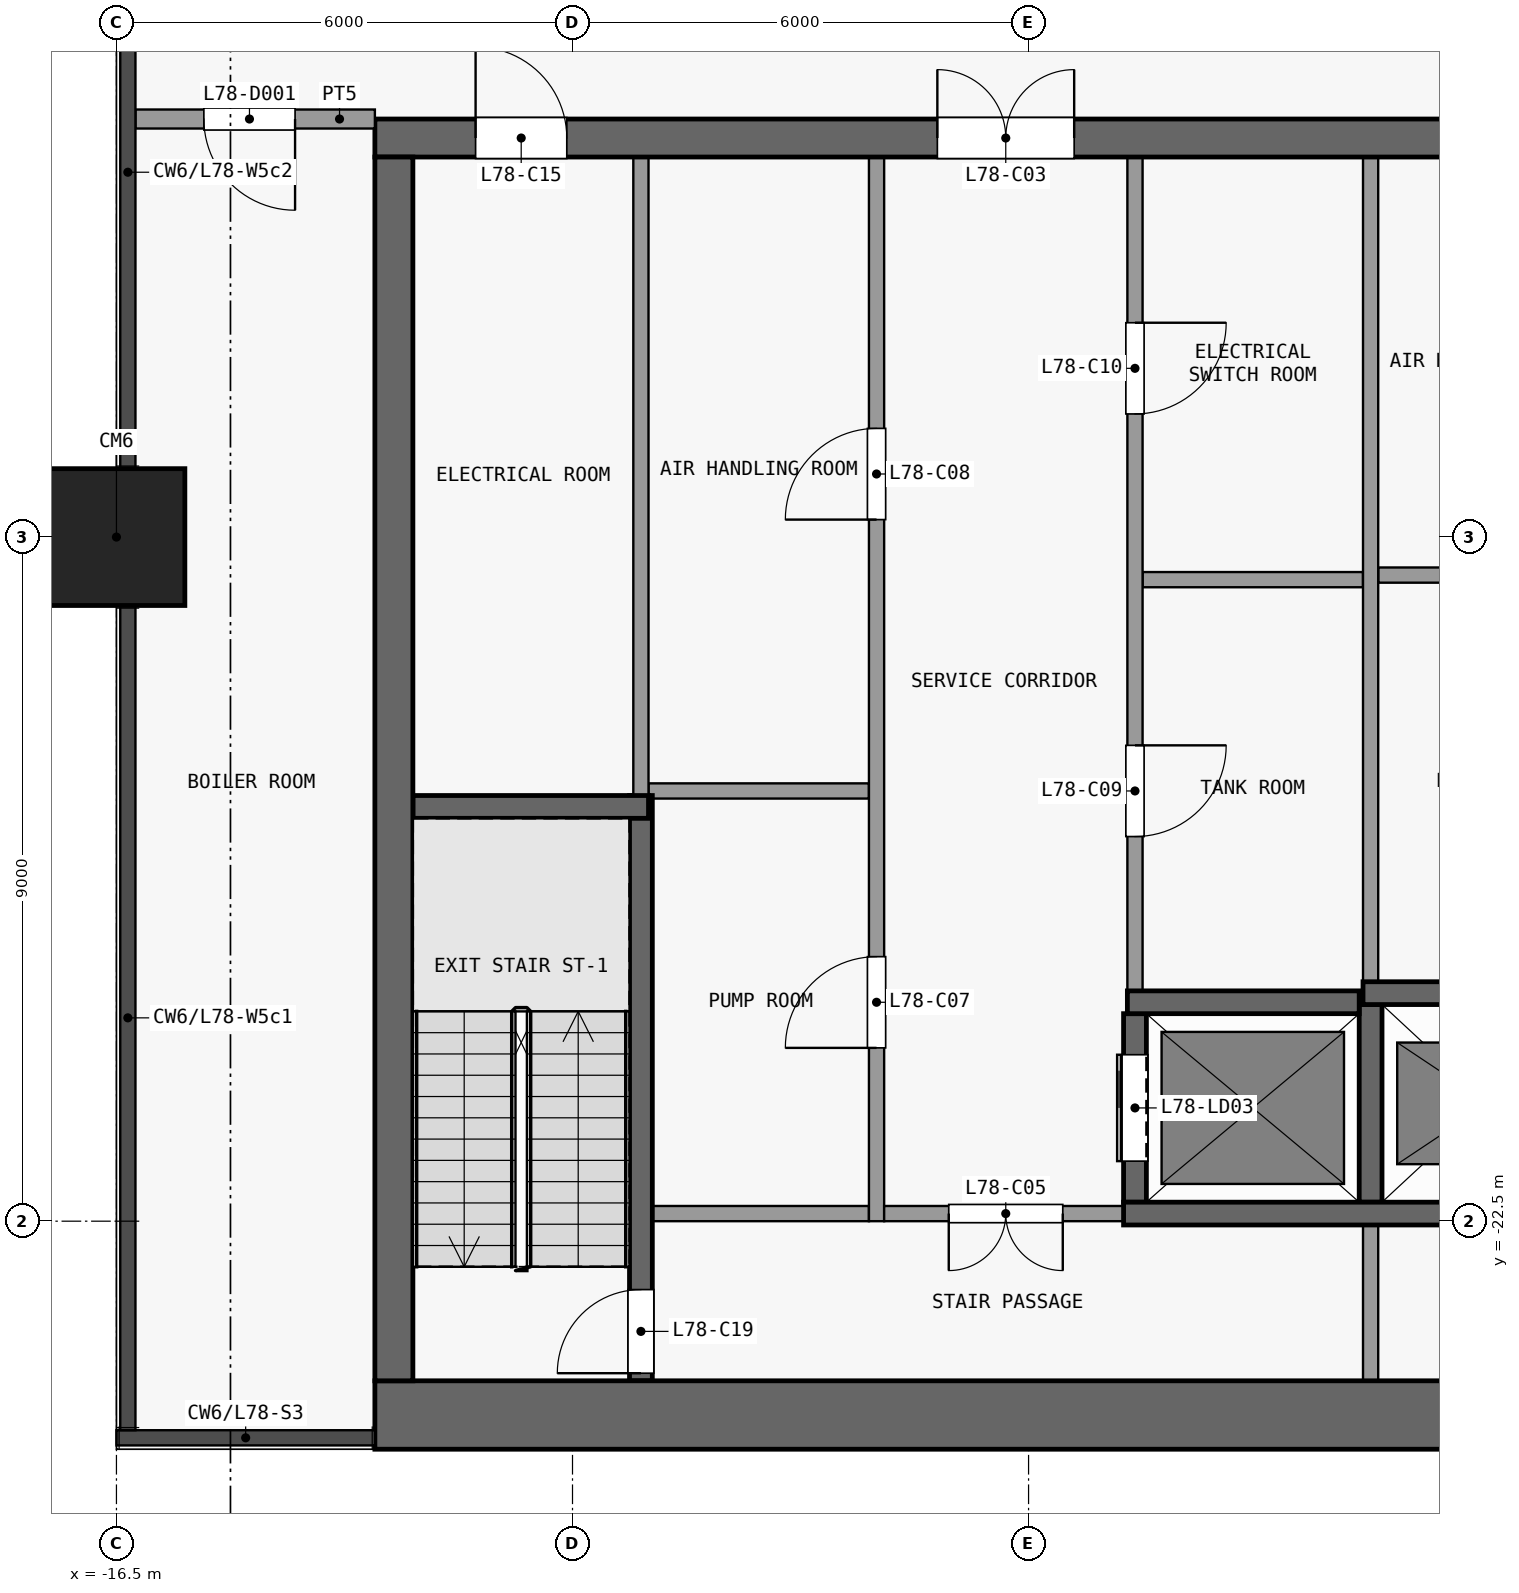
"""IFC4 building model, lengths in metres.
Left out: names, types, materials, properties, quantities, classifications, styles, units other than length and angle.
Written with IfcOpenShell. Run it as: python <this file> out.ifc"""

import sys

from ifc_helpers import new_model, si_unit, direction, frame, frame_2d, origin, origin_2d, place, context, subcontext, project, spatial, rectangle, extrude, element, fill, save


model = new_model("IFC4")
c1 = context("Model", 3, precision=1e-05, world=origin(), true_north=direction((0.0, 1.0)))
c2 = subcontext(c1, "Body", "Model", "MODEL_VIEW")
j1 = project(units=[si_unit("LENGTHUNIT", "METRE"), si_unit("PLANEANGLEUNIT", "RADIAN")], contexts=[c1])
p1 = place(None, origin())
s1 = spatial("IfcSite", under=j1, at=p1, CompositionType="ELEMENT")
p2 = place(p1, origin())
s2 = spatial("IfcBuilding", under=s1, at=p2, CompositionType="ELEMENT")
p3 = place(p2, frame((0.0, 0.0, 307.7)))
s3 = spatial("IfcBuildingStorey", under=s2, at=p3, CompositionType="ELEMENT", Elevation=307.7)
p4 = place(p3, frame((-16.5, -13.5, 0.0), z_axis=(0.0, 0.0, 1.0), x_axis=(1.0, 0.0, 0.0)))
e1 = element("IfcColumn", 1, at=p4, inside=s3, PredefinedType="COLUMN", context=c2, shape_type="SweptSolid", body=[
    extrude(rectangle(XDim=1.8, YDim=1.8, at=origin_2d()), origin(), (0.0, 0.0, 1.0), 4.5),
])
p5 = place(p3, frame((-13.1, -25.05, 0.0), z_axis=(0.0, 0.0, 1.0), x_axis=(1.0, 0.0, 0.0)))
e2 = element("IfcWall", 2, at=p5, inside=s3, PredefinedType="SHEAR", context=c2, shape_type="SweptSolid", body=[
    extrude(rectangle(XDim=26.2, YDim=0.9, at=frame_2d((13.1, 0.0))), origin(), (0.0, 0.0, 1.0), 4.1),
])
p6 = place(p3, frame((-13.1, -8.25, 0.0), z_axis=(0.0, 0.0, 1.0), x_axis=(1.0, 0.0, 0.0)))
e3 = element("IfcWall", 3, at=p6, inside=s3, PredefinedType="SHEAR", context=c2, shape_type="SweptSolid", body=[
    extrude(rectangle(XDim=26.2, YDim=0.5, at=frame_2d((13.1, 0.0))), origin(), (0.0, 0.0, 1.0), 4.1),
])
p7 = place(p6, frame((7.4, 0.0, 0.0)))
e4 = element("IfcOpeningElement", 4, at=p7, cuts=e3, PredefinedType="OPENING", context=c2, shape_type="SweptSolid", body=[
    extrude(rectangle(XDim=1.8, YDim=2.1, at=frame_2d((0.9, 1.05))), frame((0.0, 0.26, 0.0), z_axis=(0.0, -1.0, 0.0), x_axis=(1.0, 0.0, 0.0)), (0.0, 0.0, 1.0), 0.52),
])
p8 = place(p6, frame((17.0, 0.0, 0.0)))
e5 = element("IfcOpeningElement", 5, at=p8, cuts=e3, PredefinedType="OPENING", context=c2, shape_type="SweptSolid", body=[
    extrude(rectangle(XDim=1.8, YDim=2.1, at=frame_2d((0.9, 1.05))), frame((0.0, 0.26, 0.0), z_axis=(0.0, -1.0, 0.0), x_axis=(1.0, 0.0, 0.0)), (0.0, 0.0, 1.0), 0.52),
])
p9 = place(p6, frame((1.325, 0.0, 0.0)))
e6 = element("IfcOpeningElement", 6, at=p9, cuts=e3, PredefinedType="OPENING", context=c2, shape_type="SweptSolid", body=[
    extrude(rectangle(XDim=1.2, YDim=2.1, at=frame_2d((0.6, 1.05))), frame((0.0, 0.26, 0.0), z_axis=(0.0, -1.0, 0.0), x_axis=(1.0, 0.0, 0.0)), (0.0, 0.0, 1.0), 0.52),
])
p10 = place(p6, frame((22.975, 0.0, 0.0)))
e7 = element("IfcOpeningElement", 7, at=p10, cuts=e3, PredefinedType="OPENING", context=c2, shape_type="SweptSolid", body=[
    extrude(rectangle(XDim=0.9, YDim=2.1, at=frame_2d((0.45, 1.05))), frame((0.0, 0.26, 0.0), z_axis=(0.0, -1.0, 0.0), x_axis=(1.0, 0.0, 0.0)), (0.0, 0.0, 1.0), 0.52),
])
p11 = place(p3, frame((-12.85, -24.6, 0.0), z_axis=(0.0, 0.0, 1.0), x_axis=(0.0, 1.0, 0.0)))
e8 = element("IfcWall", 8, at=p11, inside=s3, PredefinedType="SHEAR", context=c2, shape_type="SweptSolid", body=[
    extrude(rectangle(XDim=16.1, YDim=0.5, at=frame_2d((8.05, 0.0))), origin(), (0.0, 0.0, 1.0), 4.1),
])
p12 = place(p3, frame((-9.45, -22.4, 0.0), z_axis=(0.0, 0.0, 1.0), x_axis=(1.0, 0.0, 0.0)))
e9 = element("IfcWall", 9, at=p12, inside=s3, PredefinedType="PARTITIONING", context=c2, shape_type="SweptSolid", body=[
    extrude(rectangle(XDim=2.85, YDim=0.2, at=frame_2d((1.425, 0.0))), origin(), (0.0, 0.0, 1.0), 4.1),
])
p13 = place(p3, frame((-3.25, -22.4, 0.0), z_axis=(0.0, 0.0, 1.0), x_axis=(-1.0, 0.0, 0.0)))
e10 = element("IfcWall", 10, at=p13, inside=s3, PredefinedType="PARTITIONING", context=c2, shape_type="SweptSolid", body=[
    extrude(rectangle(XDim=3.15, YDim=0.2, at=frame_2d((1.575, 0.0))), origin(), (0.0, 0.0, 1.0), 4.1),
])
p14 = place(p13, frame((0.8, 0.0, 0.0)))
e11 = element("IfcOpeningElement", 11, at=p14, cuts=e10, PredefinedType="OPENING", context=c2, shape_type="SweptSolid", body=[
    extrude(rectangle(XDim=1.5, YDim=2.1, at=frame_2d((0.75, 1.05))), frame((0.0, 0.11, 0.0), z_axis=(0.0, -1.0, 0.0), x_axis=(1.0, 0.0, 0.0)), (0.0, 0.0, 1.0), 0.22),
])
p15 = place(p3, frame((-3.25, -22.4, 0.0), z_axis=(0.0, 0.0, 1.0), x_axis=(1.0, 0.0, 0.0)))
e12 = element("IfcWall", 12, at=p15, inside=s3, PredefinedType="SHEAR", context=c2, shape_type="SweptSolid", body=[
    extrude(rectangle(XDim=6.5, YDim=0.3, at=frame_2d((3.25, 0.0))), origin(), (0.0, 0.0, 1.0), 4.1),
])
p16 = place(p3, frame((-3.2, -19.62, 0.0), z_axis=(0.0, 0.0, 1.0), x_axis=(1.0, 0.0, 0.0)))
e13 = element("IfcWall", 13, at=p16, inside=s3, PredefinedType="SHEAR", context=c2, shape_type="SweptSolid", body=[
    extrude(rectangle(XDim=3.05, YDim=0.3, at=frame_2d((1.525, 0.0))), origin(), (0.0, 0.0, 1.0), 4.1),
])
p17 = place(p3, frame((-0.1, -19.5, 0.0), z_axis=(0.0, 0.0, 1.0), x_axis=(1.0, 0.0, 0.0)))
e14 = element("IfcWall", 14, at=p17, inside=s3, PredefinedType="SHEAR", context=c2, shape_type="SweptSolid", body=[
    extrude(rectangle(XDim=3.3, YDim=0.3, at=frame_2d((1.65, 0.0))), origin(), (0.0, 0.0, 1.0), 4.1),
])
p18 = place(p3, frame((-12.6, -17.05, 0.0), z_axis=(0.0, 0.0, 1.0), x_axis=(1.0, 0.0, 0.0)))
e15 = element("IfcWall", 15, at=p18, inside=s3, PredefinedType="SHEAR", context=c2, shape_type="SweptSolid", body=[
    extrude(rectangle(XDim=3.1, YDim=0.3, at=frame_2d((1.55, 0.0))), origin(), (0.0, 0.0, 1.0), 4.1),
])
for number, where, z_axis, x_axis in (
    (16, (-9.5, -16.84, 0.0), (0.0, 0.0, 1.0), (1.0, 0.0, 0.0)),
    (17, (-3.0, -14.06, 0.0), (0.0, 0.0, 1.0), (1.0, 0.0, 0.0)),
    (18, (0.1, -14.0, 0.0), (0.0, 0.0, 1.0), (1.0, 0.0, 0.0)),
):
    element("IfcWall", number, at=place(p3, frame(where, z_axis=z_axis, x_axis=x_axis)), inside=s3, PredefinedType="PARTITIONING", context=c2, shape_type="SweptSolid", body=[
        extrude(rectangle(XDim=2.9, YDim=0.2, at=frame_2d((1.45, 0.0))), origin(), (0.0, 0.0, 1.0), 4.1),
    ])
p19 = place(p3, frame((-9.6, -24.6, 0.0), z_axis=(0.0, 0.0, 1.0), x_axis=(0.0, 1.0, 0.0)))
e19 = element("IfcWall", 19, at=p19, inside=s3, PredefinedType="SHEAR", context=c2, shape_type="SweptSolid", body=[
    extrude(rectangle(XDim=7.7, YDim=0.3, at=frame_2d((3.85, 0.0))), origin(), (0.0, 0.0, 1.0), 4.1),
])
p20 = place(p19, frame((0.1, 0.0, 0.0)))
e20 = element("IfcOpeningElement", 20, at=p20, cuts=e19, PredefinedType="OPENING", context=c2, shape_type="SweptSolid", body=[
    extrude(rectangle(XDim=1.1, YDim=2.1, at=frame_2d((0.55, 1.05))), frame((0.0, 0.16, 0.0), z_axis=(0.0, -1.0, 0.0), x_axis=(1.0, 0.0, 0.0)), (0.0, 0.0, 1.0), 0.32),
])
p21 = place(p3, frame((-9.6, -16.9, 0.0), z_axis=(0.0, 0.0, 1.0), x_axis=(0.0, 1.0, 0.0)))
e21 = element("IfcWall", 21, at=p21, inside=s3, PredefinedType="PARTITIONING", context=c2, shape_type="SweptSolid", body=[
    extrude(rectangle(XDim=8.4, YDim=0.2, at=frame_2d((4.2, 0.0))), origin(), (0.0, 0.0, 1.0), 4.1),
])
p22 = place(p3, frame((-6.5, -22.5, 0.0), z_axis=(0.0, 0.0, 1.0), x_axis=(0.0, 1.0, 0.0)))
e22 = element("IfcWall", 22, at=p22, inside=s3, PredefinedType="PARTITIONING", context=c2, shape_type="SweptSolid", body=[
    extrude(rectangle(XDim=14.0, YDim=0.2, at=frame_2d((7.0, 0.0))), origin(), (0.0, 0.0, 1.0), 4.1),
])
p23 = place(p22, frame((2.28, 0.0, 0.0)))
e23 = element("IfcOpeningElement", 23, at=p23, cuts=e22, PredefinedType="OPENING", context=c2, shape_type="SweptSolid", body=[
    extrude(rectangle(XDim=1.2, YDim=2.1, at=frame_2d((0.6, 1.05))), frame((0.0, 0.11, 0.0), z_axis=(0.0, -1.0, 0.0), x_axis=(1.0, 0.0, 0.0)), (0.0, 0.0, 1.0), 0.22),
])
p24 = place(p22, frame((9.23, 0.0, 0.0)))
e24 = element("IfcOpeningElement", 24, at=p24, cuts=e22, PredefinedType="OPENING", context=c2, shape_type="SweptSolid", body=[
    extrude(rectangle(XDim=1.2, YDim=2.1, at=frame_2d((0.6, 1.05))), frame((0.0, 0.11, 0.0), z_axis=(0.0, -1.0, 0.0), x_axis=(1.0, 0.0, 0.0)), (0.0, 0.0, 1.0), 0.22),
])
p25 = place(p3, frame((-3.1, -22.25, 0.0), z_axis=(0.0, 0.0, 1.0), x_axis=(0.0, 1.0, 0.0)))
e25 = element("IfcWall", 25, at=p25, inside=s3, PredefinedType="SHEAR", context=c2, shape_type="SweptSolid", body=[
    extrude(rectangle(XDim=2.48, YDim=0.3, at=frame_2d((1.24, 0.0))), origin(), (0.0, 0.0, 1.0), 4.1),
])
p26 = place(p25, frame((0.54, 0.0, 0.0)))
e26 = element("IfcOpeningElement", 26, at=p26, cuts=e25, PredefinedType="OPENING", context=c2, shape_type="SweptSolid", body=[
    extrude(rectangle(XDim=1.4, YDim=2.1, at=frame_2d((0.7, 1.05))), frame((0.0, 0.16, 0.0), z_axis=(0.0, -1.0, 0.0), x_axis=(1.0, 0.0, 0.0)), (0.0, 0.0, 1.0), 0.32),
])
p27 = place(p3, frame((-3.1, -8.5, 0.0), z_axis=(0.0, 0.0, 1.0), x_axis=(0.0, -1.0, 0.0)))
e27 = element("IfcWall", 27, at=p27, inside=s3, PredefinedType="PARTITIONING", context=c2, shape_type="SweptSolid", body=[
    extrude(rectangle(XDim=10.97, YDim=0.2, at=frame_2d((5.485, 0.0))), origin(), (0.0, 0.0, 1.0), 4.1),
])
p28 = place(p27, frame((7.74, 0.0, 0.0)))
e28 = element("IfcOpeningElement", 28, at=p28, cuts=e27, PredefinedType="OPENING", context=c2, shape_type="SweptSolid", body=[
    extrude(rectangle(XDim=1.2, YDim=2.1, at=frame_2d((0.6, 1.05))), frame((0.0, 0.11, 0.0), z_axis=(0.0, -1.0, 0.0), x_axis=(1.0, 0.0, 0.0)), (0.0, 0.0, 1.0), 0.22),
])
p29 = place(p27, frame((2.18, 0.0, 0.0)))
e29 = element("IfcOpeningElement", 29, at=p29, cuts=e27, PredefinedType="OPENING", context=c2, shape_type="SweptSolid", body=[
    extrude(rectangle(XDim=1.2, YDim=2.1, at=frame_2d((0.6, 1.05))), frame((0.0, 0.11, 0.0), z_axis=(0.0, -1.0, 0.0), x_axis=(1.0, 0.0, 0.0)), (0.0, 0.0, 1.0), 0.22),
])
p30 = place(p3, frame((0.0, -24.6, 0.0), z_axis=(0.0, 0.0, 1.0), x_axis=(0.0, 1.0, 0.0)))
e30 = element("IfcWall", 30, at=p30, inside=s3, PredefinedType="PARTITIONING", context=c2, shape_type="SweptSolid", body=[
    extrude(rectangle(XDim=2.05, YDim=0.2, at=frame_2d((1.025, 0.0))), origin(), (0.0, 0.0, 1.0), 4.1),
])
p31 = place(p3, frame((0.0, -22.25, 0.0), z_axis=(0.0, 0.0, 1.0), x_axis=(0.0, 1.0, 0.0)))
e31 = element("IfcWall", 31, at=p31, inside=s3, PredefinedType="SHEAR", context=c2, shape_type="SweptSolid", body=[
    extrude(rectangle(XDim=2.6, YDim=0.3, at=frame_2d((1.3, 0.0))), origin(), (0.0, 0.0, 1.0), 4.1),
])
p32 = place(p3, frame((0.0, -19.35, 0.0), z_axis=(0.0, 0.0, 1.0), x_axis=(0.0, 1.0, 0.0)))
e32 = element("IfcWall", 32, at=p32, inside=s3, PredefinedType="PARTITIONING", context=c2, shape_type="SweptSolid", body=[
    extrude(rectangle(XDim=10.85, YDim=0.2, at=frame_2d((5.425, 0.0))), origin(), (0.0, 0.0, 1.0), 4.1),
])
p33 = place(p3, frame((-16.25, -8.0, 0.0), z_axis=(0.0, 0.0, 1.0), x_axis=(1.0, 0.0, 0.0)))
e33 = element("IfcWall", 33, at=p33, inside=s3, PredefinedType="PARTITIONING", context=c2, shape_type="SweptSolid", body=[
    extrude(rectangle(XDim=3.15, YDim=0.25, at=frame_2d((1.575, 0.0))), origin(), (0.0, 0.0, 1.0), 4.1),
])
p34 = place(p33, frame((0.9, 0.0, 0.0)))
e34 = element("IfcOpeningElement", 34, at=p34, cuts=e33, PredefinedType="OPENING", context=c2, shape_type="SweptSolid", body=[
    extrude(rectangle(XDim=1.2, YDim=2.1, at=frame_2d((0.6, 1.05))), frame((0.0, 0.135, 0.0), z_axis=(0.0, -1.0, 0.0), x_axis=(1.0, 0.0, 0.0)), (0.0, 0.0, 1.0), 0.27),
])
p35 = place(p26, origin())
e35 = element("IfcDoor", 35, at=p35, inside=s3, OperationType="DOUBLE_DOOR_SLIDING", PredefinedType="DOOR", context=c2, shape_type="SweptSolid", body=[
    extrude(rectangle(XDim=1.4, YDim=2.1, at=frame_2d((0.7, 1.05))), frame((0.0, 0.025, 0.0), z_axis=(0.0, -1.0, 0.0), x_axis=(1.0, 0.0, 0.0)), (0.0, 0.0, 1.0), 0.05),
])
fill(e26, e35)
p36 = place(p7, origin())
e36 = element("IfcDoor", 36, at=p36, inside=s3, OperationType="DOUBLE_DOOR_SINGLE_SWING", PredefinedType="DOOR", context=c2, shape_type="SweptSolid", body=[
    extrude(rectangle(XDim=1.8, YDim=2.1, at=frame_2d((0.9, 1.05))), frame((0.0, 0.025, 0.0), z_axis=(0.0, -1.0, 0.0), x_axis=(1.0, 0.0, 0.0)), (0.0, 0.0, 1.0), 0.05),
])
fill(e4, e36)
p37 = place(p14, origin())
e37 = element("IfcDoor", 37, at=p37, inside=s3, OperationType="DOUBLE_DOOR_SINGLE_SWING", PredefinedType="DOOR", context=c2, shape_type="SweptSolid", body=[
    extrude(rectangle(XDim=1.5, YDim=2.1, at=frame_2d((0.75, 1.05))), frame((0.0, 0.025, 0.0), z_axis=(0.0, -1.0, 0.0), x_axis=(1.0, 0.0, 0.0)), (0.0, 0.0, 1.0), 0.05),
])
fill(e11, e37)
p38 = place(p23, origin())
e38 = element("IfcDoor", 38, at=p38, inside=s3, OperationType="SINGLE_SWING_LEFT", PredefinedType="DOOR", context=c2, shape_type="SweptSolid", body=[
    extrude(rectangle(XDim=1.2, YDim=2.1, at=frame_2d((0.6, 1.05))), frame((0.0, 0.025, 0.0), z_axis=(0.0, -1.0, 0.0), x_axis=(1.0, 0.0, 0.0)), (0.0, 0.0, 1.0), 0.05),
])
fill(e23, e38)
p39 = place(p24, origin())
e39 = element("IfcDoor", 39, at=p39, inside=s3, OperationType="SINGLE_SWING_LEFT", PredefinedType="DOOR", context=c2, shape_type="SweptSolid", body=[
    extrude(rectangle(XDim=1.2, YDim=2.1, at=frame_2d((0.6, 1.05))), frame((0.0, 0.025, 0.0), z_axis=(0.0, -1.0, 0.0), x_axis=(1.0, 0.0, 0.0)), (0.0, 0.0, 1.0), 0.05),
])
fill(e24, e39)
p40 = place(p28, origin())
e40 = element("IfcDoor", 40, at=p40, inside=s3, OperationType="SINGLE_SWING_LEFT", PredefinedType="DOOR", context=c2, shape_type="SweptSolid", body=[
    extrude(rectangle(XDim=1.2, YDim=2.1, at=frame_2d((0.6, 1.05))), frame((0.0, 0.025, 0.0), z_axis=(0.0, -1.0, 0.0), x_axis=(1.0, 0.0, 0.0)), (0.0, 0.0, 1.0), 0.05),
])
fill(e28, e40)
p41 = place(p29, origin())
e41 = element("IfcDoor", 41, at=p41, inside=s3, OperationType="SINGLE_SWING_LEFT", PredefinedType="DOOR", context=c2, shape_type="SweptSolid", body=[
    extrude(rectangle(XDim=1.2, YDim=2.1, at=frame_2d((0.6, 1.05))), frame((0.0, 0.025, 0.0), z_axis=(0.0, -1.0, 0.0), x_axis=(1.0, 0.0, 0.0)), (0.0, 0.0, 1.0), 0.05),
])
fill(e29, e41)
p42 = place(p9, origin())
e42 = element("IfcDoor", 42, at=p42, inside=s3, OperationType="SINGLE_SWING_LEFT", PredefinedType="DOOR", context=c2, shape_type="SweptSolid", body=[
    extrude(rectangle(XDim=1.2, YDim=2.1, at=frame_2d((0.6, 1.05))), frame((0.0, 0.025, 0.0), z_axis=(0.0, -1.0, 0.0), x_axis=(1.0, 0.0, 0.0)), (0.0, 0.0, 1.0), 0.05),
])
fill(e6, e42)
p43 = place(p20, origin())
e43 = element("IfcDoor", 43, at=p43, inside=s3, OperationType="SINGLE_SWING_LEFT", PredefinedType="DOOR", context=c2, shape_type="SweptSolid", body=[
    extrude(rectangle(XDim=1.1, YDim=2.1, at=frame_2d((0.55, 1.05))), frame((0.0, 0.025, 0.0), z_axis=(0.0, -1.0, 0.0), x_axis=(1.0, 0.0, 0.0)), (0.0, 0.0, 1.0), 0.05),
])
fill(e20, e43)
p44 = place(p34, origin())
e44 = element("IfcDoor", 44, at=p44, inside=s3, OperationType="SINGLE_SWING_RIGHT", PredefinedType="DOOR", context=c2, shape_type="SweptSolid", body=[
    extrude(rectangle(XDim=1.2, YDim=2.1, at=frame_2d((0.6, 1.05))), frame((0.0, 0.025, 0.0), z_axis=(0.0, -1.0, 0.0), x_axis=(1.0, 0.0, 0.0)), (0.0, 0.0, 1.0), 0.05),
])
fill(e34, e44)
save(model, sys.argv[1])
